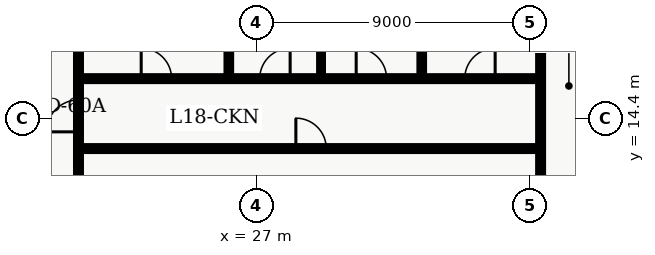
"""IFC4 building model, lengths in metres.
Left out: names, types, materials, properties, quantities, classifications, styles, units other than length and angle.
Written with IfcOpenShell. Run it as: python <this file> out.ifc"""

import sys

from ifc_helpers import new_model, entity, si_unit, converted_unit, direction, frame, origin_with_axes, origin_2d_with_axis, place, context, subcontext, project, spatial, polyline, rectangle, outline, extrude, element, fill, save


model = new_model("IFC4")
c1 = context("Model", 3, precision=1e-05, world=origin_with_axes(), true_north=direction((0.0, 1.0)))
c2 = subcontext(c1, "Body", "Model", "MODEL_VIEW")
j1 = project(units=[si_unit("LENGTHUNIT", "METRE"), converted_unit("PLANEANGLEUNIT", "DEGREE", entity("IfcPlaneAngleMeasure", 0.017), si_unit("PLANEANGLEUNIT", "RADIAN"), dimensions=[0, 0, 0, 0, 0, 0, 0])], contexts=[c1])
p1 = place(None, origin_with_axes())
s1 = spatial("IfcSite", under=j1, at=p1, CompositionType="ELEMENT")
p2 = place(p1, origin_with_axes())
s2 = spatial("IfcBuilding", under=s1, at=p2, CompositionType="ELEMENT")
p3 = place(p2, frame((0.0, 0.0, 75.6), z_axis=(0.0, 0.0, 1.0), x_axis=(1.0, 0.0, 0.0)))
s3 = spatial("IfcBuildingStorey", under=s2, at=p3, CompositionType="ELEMENT", Elevation=75.6)
p4 = place(p3, frame((21.15, 7.8, 0.0), z_axis=(0.0, 0.0, 1.0), x_axis=(0.0, 1.0, 0.0)))
e1 = element("IfcWall", 1, at=p4, inside=s3, PredefinedType="PARTITIONING", context=c2, shape_type="SweptSolid", body=[
    extrude(outline(polyline([(0.0, -0.08), (32.7, -0.08), (32.7, 0.08), (0.0, 0.08), (0.0, -0.08)])), origin_with_axes(), (0.0, 0.0, 1.0), 2.64),
])
p5 = place(p4, frame((6.675, 0.0, 0.0), z_axis=(0.0, 0.0, 1.0), x_axis=(1.0, 0.0, 0.0)))
e2 = element("IfcOpeningElement", 2, at=p5, cuts=e1, PredefinedType="OPENING", context=c2, shape_type="SweptSolid", body=[
    extrude(rectangle(XDim=1.05, YDim=0.18, at=origin_2d_with_axis()), origin_with_axes(), (0.0, 0.0, 1.0), 2.15),
])
p6 = place(p3, frame((21.15, 13.4, 0.0), z_axis=(0.0, 0.0, 1.0), x_axis=(1.0, 0.0, 0.0)))
e3 = element("IfcWall", 3, at=p6, inside=s3, PredefinedType="PARTITIONING", context=c2, shape_type="SweptSolid", body=[
    extrude(outline(polyline([(0.0, -0.08), (15.2, -0.08), (15.2, 0.08), (0.0, 0.08), (0.0, -0.08)])), origin_with_axes(), (0.0, 0.0, 1.0), 2.64),
])
p7 = place(p6, frame((7.65, 0.0, 0.0), z_axis=(0.0, 0.0, 1.0), x_axis=(1.0, 0.0, 0.0)))
e4 = element("IfcOpeningElement", 4, at=p7, cuts=e3, PredefinedType="OPENING", context=c2, shape_type="SweptSolid", body=[
    extrude(rectangle(XDim=1.0, YDim=0.18, at=origin_2d_with_axis()), origin_with_axes(), (0.0, 0.0, 1.0), 2.15),
])
p8 = place(p3, frame((21.15, 15.7, 0.0), z_axis=(0.0, 0.0, 1.0), x_axis=(1.0, 0.0, 0.0)))
e5 = element("IfcWall", 5, at=p8, inside=s3, PredefinedType="PARTITIONING", context=c2, shape_type="SweptSolid", body=[
    extrude(outline(polyline([(0.0, -0.08), (15.2, -0.08), (15.2, 0.08), (0.0, 0.08), (0.0, -0.08)])), origin_with_axes(), (0.0, 0.0, 1.0), 2.64),
])
p9 = place(p8, frame((2.562, 0.0, 0.0), z_axis=(0.0, 0.0, 1.0), x_axis=(1.0, 0.0, 0.0)))
e6 = element("IfcOpeningElement", 6, at=p9, cuts=e5, PredefinedType="OPENING", context=c2, shape_type="SweptSolid", body=[
    extrude(rectangle(XDim=1.0, YDim=0.18, at=origin_2d_with_axis()), origin_with_axes(), (0.0, 0.0, 1.0), 2.15),
])
p10 = place(p8, frame((6.462, 0.0, 0.0), z_axis=(0.0, 0.0, 1.0), x_axis=(1.0, 0.0, 0.0)))
e7 = element("IfcOpeningElement", 7, at=p10, cuts=e5, PredefinedType="OPENING", context=c2, shape_type="SweptSolid", body=[
    extrude(rectangle(XDim=1.0, YDim=0.18, at=origin_2d_with_axis()), origin_with_axes(), (0.0, 0.0, 1.0), 2.15),
])
p11 = place(p8, frame((9.634, 0.0, 0.0), z_axis=(0.0, 0.0, 1.0), x_axis=(1.0, 0.0, 0.0)))
e8 = element("IfcOpeningElement", 8, at=p11, cuts=e5, PredefinedType="OPENING", context=c2, shape_type="SweptSolid", body=[
    extrude(rectangle(XDim=1.0, YDim=0.18, at=origin_2d_with_axis()), origin_with_axes(), (0.0, 0.0, 1.0), 2.15),
])
p12 = place(p8, frame((13.205, 0.0, 0.0), z_axis=(0.0, 0.0, 1.0), x_axis=(1.0, 0.0, 0.0)))
e9 = element("IfcOpeningElement", 9, at=p12, cuts=e5, PredefinedType="OPENING", context=c2, shape_type="SweptSolid", body=[
    extrude(rectangle(XDim=1.0, YDim=0.18, at=origin_2d_with_axis()), origin_with_axes(), (0.0, 0.0, 1.0), 2.15),
])
p13 = place(p3, frame((36.35, 4.35, 0.0), z_axis=(0.0, 0.0, 1.0), x_axis=(0.0, 1.0, 0.0)))
e10 = element("IfcWall", 10, at=p13, inside=s3, PredefinedType="PARTITIONING", context=c2, shape_type="SweptSolid", body=[
    extrude(outline(polyline([(0.0, -0.08), (16.95, -0.08), (16.95, 0.08), (0.0, 0.08), (0.0, -0.08)])), origin_with_axes(), (0.0, 0.0, 1.0), 2.64),
])
p14 = place(p3, frame((26.095, 15.82, 0.0), z_axis=(0.0, 0.0, 1.0), x_axis=(0.0, 1.0, 0.0)))
e11 = element("IfcWall", 11, at=p14, inside=s3, PredefinedType="PARTITIONING", context=c2, shape_type="SweptSolid", body=[
    extrude(outline(polyline([(0.0, -0.075), (5.405, -0.075), (5.405, 0.075), (0.0, 0.075), (0.0, -0.075)])), origin_with_axes(), (0.0, 0.0, 1.0), 2.64),
])
p15 = place(p3, frame((29.128, 15.82, 0.0), z_axis=(0.0, 0.0, 1.0), x_axis=(0.0, 1.0, 0.0)))
e12 = element("IfcWall", 12, at=p15, inside=s3, PredefinedType="PARTITIONING", context=c2, shape_type="SweptSolid", body=[
    extrude(outline(polyline([(0.0, -0.062), (5.405, -0.062), (5.405, 0.062), (0.0, 0.062), (0.0, -0.062)])), origin_with_axes(), (0.0, 0.0, 1.0), 2.64),
])
p16 = place(p3, frame((32.44, 15.82, 0.0), z_axis=(0.0, 0.0, 1.0), x_axis=(0.0, 1.0, 0.0)))
e13 = element("IfcWall", 13, at=p16, inside=s3, PredefinedType="PARTITIONING", context=c2, shape_type="SweptSolid", body=[
    extrude(outline(polyline([(0.0, -0.075), (5.405, -0.075), (5.405, 0.075), (0.0, 0.075), (0.0, -0.075)])), origin_with_axes(), (0.0, 0.0, 1.0), 2.64),
])
p17 = place(p4, frame((6.675, 0.0, 0.0), z_axis=(0.0, 0.0, 1.0), x_axis=(1.0, 0.0, 0.0)))
e14 = element("IfcDoor", 14, at=p17, inside=s3, OperationType="SINGLE_SWING_LEFT", PredefinedType="DOOR", context=c2, shape_type="SweptSolid", body=[
    extrude(rectangle(XDim=1.05, YDim=0.09, at=origin_2d_with_axis()), origin_with_axes(), (0.0, 0.0, 1.0), 2.15),
])
fill(e2, e14)
p18 = place(p6, frame((7.65, 0.0, 0.0), z_axis=(0.0, 0.0, 1.0), x_axis=(1.0, 0.0, 0.0)))
e15 = element("IfcDoor", 15, at=p18, inside=s3, OperationType="SINGLE_SWING_LEFT", PredefinedType="DOOR", context=c2, shape_type="SweptSolid", body=[
    extrude(rectangle(XDim=1.0, YDim=0.09, at=origin_2d_with_axis()), origin_with_axes(), (0.0, 0.0, 1.0), 2.15),
])
fill(e4, e15)
p19 = place(p8, frame((2.562, 0.0, 0.0), z_axis=(0.0, 0.0, 1.0), x_axis=(1.0, 0.0, 0.0)))
e16 = element("IfcDoor", 16, at=p19, inside=s3, OperationType="SINGLE_SWING_LEFT", PredefinedType="DOOR", context=c2, shape_type="SweptSolid", body=[
    extrude(rectangle(XDim=1.0, YDim=0.09, at=origin_2d_with_axis()), origin_with_axes(), (0.0, 0.0, 1.0), 2.15),
])
fill(e6, e16)
p20 = place(p8, frame((6.462, 0.0, 0.0), z_axis=(0.0, 0.0, 1.0), x_axis=(1.0, 0.0, 0.0)))
e17 = element("IfcDoor", 17, at=p20, inside=s3, OperationType="SINGLE_SWING_RIGHT", PredefinedType="DOOR", context=c2, shape_type="SweptSolid", body=[
    extrude(rectangle(XDim=1.0, YDim=0.09, at=origin_2d_with_axis()), origin_with_axes(), (0.0, 0.0, 1.0), 2.15),
])
fill(e7, e17)
p21 = place(p8, frame((9.634, 0.0, 0.0), z_axis=(0.0, 0.0, 1.0), x_axis=(1.0, 0.0, 0.0)))
e18 = element("IfcDoor", 18, at=p21, inside=s3, OperationType="SINGLE_SWING_LEFT", PredefinedType="DOOR", context=c2, shape_type="SweptSolid", body=[
    extrude(rectangle(XDim=1.0, YDim=0.09, at=origin_2d_with_axis()), origin_with_axes(), (0.0, 0.0, 1.0), 2.15),
])
fill(e8, e18)
p22 = place(p8, frame((13.205, 0.0, 0.0), z_axis=(0.0, 0.0, 1.0), x_axis=(1.0, 0.0, 0.0)))
e19 = element("IfcDoor", 19, at=p22, inside=s3, OperationType="SINGLE_SWING_RIGHT", PredefinedType="DOOR", context=c2, shape_type="SweptSolid", body=[
    extrude(rectangle(XDim=1.0, YDim=0.09, at=origin_2d_with_axis()), origin_with_axes(), (0.0, 0.0, 1.0), 2.15),
])
fill(e9, e19)
save(model, sys.argv[1])
